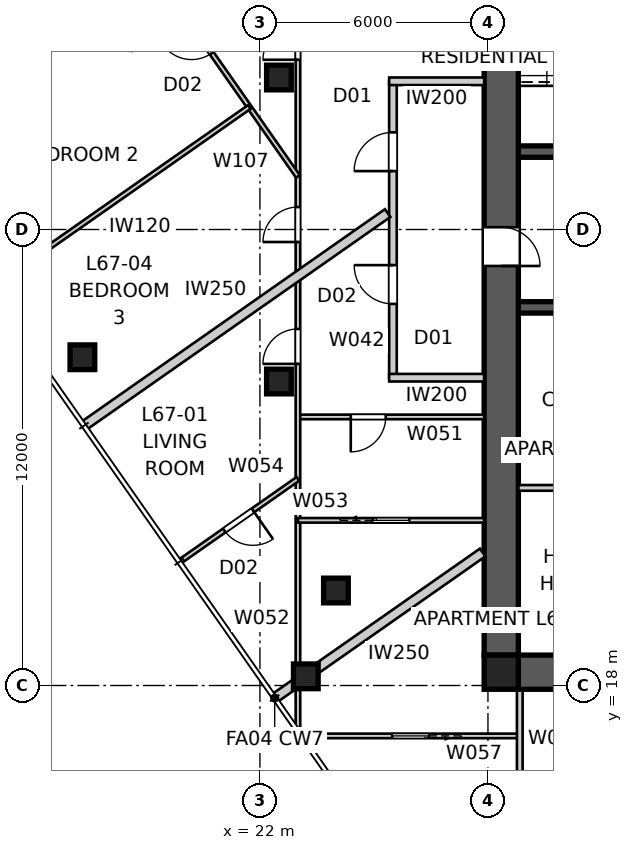
"""IFC4 building model, lengths in metres.
Left out: names, types, materials, properties, quantities, classifications, styles, units other than length and angle.
Written with IfcOpenShell. Run it as: python <this file> out.ifc"""

import sys

from ifc_helpers import new_model, si_unit, direction, frame, frame_2d, origin, origin_2d, place, context, subcontext, project, spatial, polyline, rectangle, outline, extrude, element, fill, save


model = new_model("IFC4")
c1 = context("Model", 3, precision=1e-05, world=origin(), true_north=direction((0.0, 1.0)))
c2 = subcontext(c1, "Body", "Model", "MODEL_VIEW")
j1 = project(units=[si_unit("LENGTHUNIT", "METRE"), si_unit("PLANEANGLEUNIT", "RADIAN")], contexts=[c1])
p1 = place(None, origin())
s1 = spatial("IfcSite", under=j1, at=p1, CompositionType="ELEMENT")
p2 = place(p1, origin())
s2 = spatial("IfcBuilding", under=s1, at=p2, CompositionType="ELEMENT")
p3 = place(p2, frame((0.0, 0.0, 243.8)))
s3 = spatial("IfcBuildingStorey", under=s2, at=p3, CompositionType="ELEMENT", Elevation=243.8)
p4 = place(p3, frame((51.2, 18.35, 0.0), z_axis=(0.0, 0.0, 1.0), x_axis=(-1.0, 0.0, 0.0)))
e1 = element("IfcWall", 1, at=p4, inside=s3, PredefinedType="SHEAR", context=c2, shape_type="SweptSolid", body=[
    extrude(outline(polyline([(0.0, -0.45), (22.4, -0.45), (22.4, -0.025), (22.85, -0.025), (22.85, 0.025), (22.4, 0.025), (22.4, 0.45), (0.0, 0.45), (0.0, 0.025), (-0.45, 0.025), (-0.45, -0.025), (0.0, -0.025), (0.0, -0.45)])), origin(), (0.0, 0.0, 1.0), 3.4),
])
p5 = place(p3, frame((28.35, 41.2, 0.0), z_axis=(0.0, 0.0, 1.0), x_axis=(0.0, -1.0, 0.0)))
e2 = element("IfcWall", 2, at=p5, inside=s3, PredefinedType="SHEAR", context=c2, shape_type="SweptSolid", body=[
    extrude(outline(polyline([(0.0, -0.45), (22.4, -0.45), (22.4, -0.025), (22.85, -0.025), (22.85, 0.025), (22.4, 0.025), (22.4, 0.45), (0.0, 0.45), (0.0, 0.025), (-0.45, 0.025), (-0.45, -0.025), (0.0, -0.025), (0.0, -0.45)])), origin(), (0.0, 0.0, 1.0), 3.4),
])
p6 = place(p5, frame((11.14, 0.0, 0.0)))
e3 = element("IfcOpeningElement", 3, at=p6, cuts=e2, PredefinedType="OPENING", context=c2, shape_type="SweptSolid", body=[
    extrude(rectangle(XDim=1.02, YDim=2.4, at=frame_2d((0.51, 1.2))), frame((0.0, 0.46, 0.0), z_axis=(0.0, -1.0, 0.0), x_axis=(1.0, 0.0, 0.0)), (0.0, 0.0, 1.0), 0.92),
])
p7 = place(p3, frame((28.8, 32.05, 0.0), z_axis=(0.0, 0.0, 1.0), x_axis=(1.0, 0.0, 0.0)))
e4 = element("IfcWall", 4, at=p7, inside=s3, PredefinedType="SHEAR", context=c2, shape_type="SweptSolid", body=[
    extrude(rectangle(XDim=22.4, YDim=0.3, at=frame_2d((11.2, 0.0))), origin(), (0.0, 0.0, 1.0), 3.4),
])
p8 = place(p7, frame((19.04, 0.0, 0.0)))
e5 = element("IfcOpeningElement", 5, at=p8, cuts=e4, PredefinedType="OPENING", context=c2, shape_type="SweptSolid", body=[
    extrude(rectangle(XDim=0.92, YDim=2.1, at=frame_2d((0.46, 1.05))), frame((0.0, 0.16, 0.0), z_axis=(0.0, -1.0, 0.0), x_axis=(1.0, 0.0, 0.0)), (0.0, 0.0, 1.0), 0.32),
])
p9 = place(p7, frame((1.265, 0.0, 0.0)))
e6 = element("IfcOpeningElement", 6, at=p9, cuts=e4, PredefinedType="OPENING", context=c2, shape_type="SweptSolid", body=[
    extrude(rectangle(XDim=1.02, YDim=2.1, at=frame_2d((0.51, 1.05))), frame((0.0, 0.16, 0.0), z_axis=(0.0, -1.0, 0.0), x_axis=(1.0, 0.0, 0.0)), (0.0, 0.0, 1.0), 0.32),
])
p10 = place(p7, frame((4.015, 0.0, 0.0)))
e7 = element("IfcOpeningElement", 7, at=p10, cuts=e4, PredefinedType="OPENING", context=c2, shape_type="SweptSolid", body=[
    extrude(rectangle(XDim=0.92, YDim=2.1, at=frame_2d((0.46, 1.05))), frame((0.0, 0.16, 0.0), z_axis=(0.0, -1.0, 0.0), x_axis=(1.0, 0.0, 0.0)), (0.0, 0.0, 1.0), 0.32),
])
p11 = place(p7, frame((6.115, 0.0, 0.0)))
e8 = element("IfcOpeningElement", 8, at=p11, cuts=e4, PredefinedType="OPENING", context=c2, shape_type="SweptSolid", body=[
    extrude(rectangle(XDim=0.92, YDim=2.1, at=frame_2d((0.46, 1.05))), frame((0.0, 0.16, 0.0), z_axis=(0.0, -1.0, 0.0), x_axis=(1.0, 0.0, 0.0)), (0.0, 0.0, 1.0), 0.32),
])
p12 = place(p7, frame((9.79, 0.0, 0.0)))
e9 = element("IfcOpeningElement", 9, at=p12, cuts=e4, PredefinedType="OPENING", context=c2, shape_type="SweptSolid", body=[
    extrude(rectangle(XDim=0.92, YDim=2.1, at=frame_2d((0.46, 1.05))), frame((0.0, 0.16, 0.0), z_axis=(0.0, -1.0, 0.0), x_axis=(1.0, 0.0, 0.0)), (0.0, 0.0, 1.0), 0.32),
])
p13 = place(p7, frame((12.05, 0.0, 0.0)))
e10 = element("IfcOpeningElement", 10, at=p13, cuts=e4, PredefinedType="OPENING", context=c2, shape_type="SweptSolid", body=[
    extrude(rectangle(XDim=1.1, YDim=2.1, at=frame_2d((0.55, 1.05))), frame((0.0, 0.16, 0.0), z_axis=(0.0, -1.0, 0.0), x_axis=(1.0, 0.0, 0.0)), (0.0, 0.0, 1.0), 0.32),
])
p14 = place(p7, frame((14.85, 0.0, 0.0)))
e11 = element("IfcOpeningElement", 11, at=p14, cuts=e4, PredefinedType="OPENING", context=c2, shape_type="SweptSolid", body=[
    extrude(rectangle(XDim=1.1, YDim=2.1, at=frame_2d((0.55, 1.05))), frame((0.0, 0.16, 0.0), z_axis=(0.0, -1.0, 0.0), x_axis=(1.0, 0.0, 0.0)), (0.0, 0.0, 1.0), 0.32),
])
p15 = place(p3, frame((51.2, 27.95, 0.0), z_axis=(0.0, 0.0, 1.0), x_axis=(-1.0, 0.0, 0.0)))
e12 = element("IfcWall", 12, at=p15, inside=s3, PredefinedType="SHEAR", context=c2, shape_type="SweptSolid", body=[
    extrude(rectangle(XDim=22.4, YDim=0.3, at=frame_2d((11.2, 0.0))), origin(), (0.0, 0.0, 1.0), 3.4),
])
p16 = place(p15, frame((19.04, 0.0, 0.0)))
e13 = element("IfcOpeningElement", 13, at=p16, cuts=e12, PredefinedType="OPENING", context=c2, shape_type="SweptSolid", body=[
    extrude(rectangle(XDim=0.92, YDim=2.1, at=frame_2d((0.46, 1.05))), frame((0.0, 0.16, 0.0), z_axis=(0.0, -1.0, 0.0), x_axis=(1.0, 0.0, 0.0)), (0.0, 0.0, 1.0), 0.32),
])
p17 = place(p15, frame((1.265, 0.0, 0.0)))
e14 = element("IfcOpeningElement", 14, at=p17, cuts=e12, PredefinedType="OPENING", context=c2, shape_type="SweptSolid", body=[
    extrude(rectangle(XDim=1.02, YDim=2.1, at=frame_2d((0.51, 1.05))), frame((0.0, 0.16, 0.0), z_axis=(0.0, -1.0, 0.0), x_axis=(1.0, 0.0, 0.0)), (0.0, 0.0, 1.0), 0.32),
])
p18 = place(p15, frame((4.015, 0.0, 0.0)))
e15 = element("IfcOpeningElement", 15, at=p18, cuts=e12, PredefinedType="OPENING", context=c2, shape_type="SweptSolid", body=[
    extrude(rectangle(XDim=0.92, YDim=2.1, at=frame_2d((0.46, 1.05))), frame((0.0, 0.16, 0.0), z_axis=(0.0, -1.0, 0.0), x_axis=(1.0, 0.0, 0.0)), (0.0, 0.0, 1.0), 0.32),
])
p19 = place(p15, frame((9.34, 0.0, 0.0)))
e16 = element("IfcOpeningElement", 16, at=p19, cuts=e12, PredefinedType="OPENING", context=c2, shape_type="SweptSolid", body=[
    extrude(rectangle(XDim=0.92, YDim=2.1, at=frame_2d((0.46, 1.05))), frame((0.0, 0.16, 0.0), z_axis=(0.0, -1.0, 0.0), x_axis=(1.0, 0.0, 0.0)), (0.0, 0.0, 1.0), 0.32),
])
p20 = place(p15, frame((7.015, 0.0, 0.0)))
e17 = element("IfcOpeningElement", 17, at=p20, cuts=e12, PredefinedType="OPENING", context=c2, shape_type="SweptSolid", body=[
    extrude(rectangle(XDim=0.92, YDim=2.1, at=frame_2d((0.46, 1.05))), frame((0.0, 0.16, 0.0), z_axis=(0.0, -1.0, 0.0), x_axis=(1.0, 0.0, 0.0)), (0.0, 0.0, 1.0), 0.32),
])
p21 = place(p15, frame((12.05, 0.0, 0.0)))
e18 = element("IfcOpeningElement", 18, at=p21, cuts=e12, PredefinedType="OPENING", context=c2, shape_type="SweptSolid", body=[
    extrude(rectangle(XDim=1.1, YDim=2.1, at=frame_2d((0.55, 1.05))), frame((0.0, 0.16, 0.0), z_axis=(0.0, -1.0, 0.0), x_axis=(1.0, 0.0, 0.0)), (0.0, 0.0, 1.0), 0.32),
])
p22 = place(p15, frame((14.85, 0.0, 0.0)))
e19 = element("IfcOpeningElement", 19, at=p22, cuts=e12, PredefinedType="OPENING", context=c2, shape_type="SweptSolid", body=[
    extrude(rectangle(XDim=1.1, YDim=2.1, at=frame_2d((0.55, 1.05))), frame((0.0, 0.16, 0.0), z_axis=(0.0, -1.0, 0.0), x_axis=(1.0, 0.0, 0.0)), (0.0, 0.0, 1.0), 0.32),
])
p23 = place(p3, frame((28.35, 18.35, 0.0), z_axis=(0.0, 0.0, 1.0), x_axis=(1.0, 0.0, 0.0)))
e20 = element("IfcColumn", 20, at=p23, inside=s3, PredefinedType="COLUMN", context=c2, shape_type="SweptSolid", body=[
    extrude(rectangle(XDim=0.9, YDim=0.9, at=origin_2d()), origin(), (0.0, 0.0, 1.0), 3.4),
])
for number, where, z_axis, x_axis in (
    (21, (17.328, 26.638, 0.0), (0.0, 0.0, 1.0), (1.0, 0.0, 0.0)),
    (22, (23.207, 18.242, 0.0), (0.0, 0.0, 1.0), (1.0, 0.0, 0.0)),
    (23, (22.5, 34.0, 0.0), (0.0, 0.0, 1.0), (1.0, 0.0, 0.0)),
    (24, (22.5, 26.0, 0.0), (0.0, 0.0, 1.0), (1.0, 0.0, 0.0)),
    (25, (24.0, 20.5, 0.0), (0.0, 0.0, 1.0), (1.0, 0.0, 0.0)),
):
    element("IfcColumn", number, at=place(p3, frame(where, z_axis=z_axis, x_axis=x_axis)), inside=s3, PredefinedType="COLUMN", context=c2, shape_type="SweptSolid", body=[
        extrude(rectangle(XDim=0.65, YDim=0.65, at=origin_2d()), origin(), (0.0, 0.0, 1.0), 3.4),
    ])
p24 = place(p3, frame((25.5, 26.1, 0.0), z_axis=(0.0, 0.0, 1.0), x_axis=(0.0, 1.0, 0.0)))
e26 = element("IfcWall", 26, at=p24, inside=s3, PredefinedType="PARTITIONING", context=c2, shape_type="SweptSolid", body=[
    extrude(rectangle(XDim=7.8, YDim=0.2, at=frame_2d((3.9, 0.0))), origin(), (0.0, 0.0, 1.0), 3.25),
])
p25 = place(p24, frame((1.942, 0.0, 0.0)))
e27 = element("IfcOpeningElement", 27, at=p25, cuts=e26, PredefinedType="OPENING", context=c2, shape_type="SweptSolid", body=[
    extrude(rectangle(XDim=1.02, YDim=2.34, at=frame_2d((0.51, 1.17))), frame((0.0, 0.11, 0.0), z_axis=(0.0, -1.0, 0.0), x_axis=(1.0, 0.0, 0.0)), (0.0, 0.0, 1.0), 0.22),
])
p26 = place(p24, frame((5.437, 0.0, 0.0)))
e28 = element("IfcOpeningElement", 28, at=p26, cuts=e26, PredefinedType="OPENING", context=c2, shape_type="SweptSolid", body=[
    extrude(rectangle(XDim=1.02, YDim=2.34, at=frame_2d((0.51, 1.17))), frame((0.0, 0.11, 0.0), z_axis=(0.0, -1.0, 0.0), x_axis=(1.0, 0.0, 0.0)), (0.0, 0.0, 1.0), 0.22),
])
for number, where, z_axis, x_axis in (
    (29, (27.9, 33.9, 0.0), (0.0, 0.0, 1.0), (-1.0, 0.0, 0.0)),
    (30, (27.9, 26.1, 0.0), (0.0, 0.0, 1.0), (-1.0, 0.0, 0.0)),
):
    element("IfcWall", number, at=place(p3, frame(where, z_axis=z_axis, x_axis=x_axis)), inside=s3, PredefinedType="PARTITIONING", context=c2, shape_type="SweptSolid", body=[
        extrude(rectangle(XDim=2.5, YDim=0.2, at=frame_2d((1.25, 0.0))), origin(), (0.0, 0.0, 1.0), 3.25),
    ])
p27 = place(p3, frame((22.388, 17.668, 0.0), z_axis=(0.0, 0.0, 1.0), x_axis=(0.819161528122, 0.573562891796, 0.0)))
e31 = element("IfcWall", 31, at=p27, inside=s3, PredefinedType="PARTITIONING", context=c2, shape_type="SweptSolid", body=[
    extrude(rectangle(XDim=6.681, YDim=0.25, at=frame_2d((3.341, 0.0))), origin(), (0.0, 0.0, 1.0), 3.25),
])
p28 = place(p3, frame((17.369, 24.836, 0.0), z_axis=(0.0, 0.0, 1.0), x_axis=(0.81915902312, 0.573566469418, 0.0)))
e32 = element("IfcWall", 32, at=p28, inside=s3, PredefinedType="PARTITIONING", context=c2, shape_type="SweptSolid", body=[
    extrude(rectangle(XDim=9.756, YDim=0.25, at=frame_2d((4.878, 0.0))), origin(), (0.0, 0.0, 1.0), 3.25),
])
p29 = place(p3, frame((34.25, 23.2, 0.0), z_axis=(0.0, 0.0, 1.0), x_axis=(-1.0, 0.0, 0.0)))
e33 = element("IfcWall", 33, at=p29, inside=s3, PredefinedType="SOLIDWALL", context=c2, shape_type="SweptSolid", body=[
    extrude(rectangle(XDim=5.45, YDim=0.15, at=frame_2d((2.725, 0.0))), origin(), (0.0, 0.0, 1.0), 3.25),
])
p30 = place(p29, frame((2.265, 0.0, 0.0)))
e34 = element("IfcOpeningElement", 34, at=p30, cuts=e33, PredefinedType="OPENING", context=c2, shape_type="SweptSolid", body=[
    extrude(rectangle(XDim=0.92, YDim=2.1, at=frame_2d((0.46, 1.05))), frame((0.0, 0.085, 0.0), z_axis=(0.0, -1.0, 0.0), x_axis=(1.0, 0.0, 0.0)), (0.0, 0.0, 1.0), 0.17),
])
p31 = place(p3, frame((27.9, 25.068, 0.0), z_axis=(0.0, 0.0, 1.0), x_axis=(-1.0, 0.0, 0.0)))
e35 = element("IfcWall", 35, at=p31, inside=s3, PredefinedType="PARTITIONING", context=c2, shape_type="SweptSolid", body=[
    extrude(rectangle(XDim=4.9, YDim=0.12, at=frame_2d((2.45, 0.0))), origin(), (0.0, 0.0, 1.0), 3.25),
])
p32 = place(p31, frame((2.59, 0.0, 0.0)))
e36 = element("IfcOpeningElement", 36, at=p32, cuts=e35, PredefinedType="OPENING", context=c2, shape_type="SweptSolid", body=[
    extrude(rectangle(XDim=0.92, YDim=2.34, at=frame_2d((0.46, 1.17))), frame((0.0, 0.07, 0.0), z_axis=(0.0, -1.0, 0.0), x_axis=(1.0, 0.0, 0.0)), (0.0, 0.0, 1.0), 0.14),
])
p33 = place(p3, frame((23.0, 16.864, 0.0), z_axis=(0.0, 0.0, 1.0), x_axis=(0.0, 1.0, 0.0)))
e37 = element("IfcWall", 37, at=p33, inside=s3, PredefinedType="PARTITIONING", context=c2, shape_type="SweptSolid", body=[
    extrude(rectangle(XDim=19.28, YDim=0.12, at=frame_2d((9.64, 0.0))), origin(), (0.0, 0.0, 1.0), 2.55),
])
p34 = place(p33, frame((9.599, 0.0, 0.0)))
e38 = element("IfcOpeningElement", 38, at=p34, cuts=e37, PredefinedType="OPENING", context=c2, shape_type="SweptSolid", body=[
    extrude(rectangle(XDim=0.92, YDim=2.34, at=frame_2d((0.46, 1.17))), frame((0.0, 0.07, 0.0), z_axis=(0.0, -1.0, 0.0), x_axis=(1.0, 0.0, 0.0)), (0.0, 0.0, 1.0), 0.14),
])
p35 = place(p33, frame((17.603, 0.0, 0.0)))
e39 = element("IfcOpeningElement", 39, at=p35, cuts=e37, PredefinedType="OPENING", context=c2, shape_type="SweptSolid", body=[
    extrude(rectangle(XDim=0.92, YDim=2.34, at=frame_2d((0.46, 1.17))), frame((0.0, 0.07, 0.0), z_axis=(0.0, -1.0, 0.0), x_axis=(1.0, 0.0, 0.0)), (0.0, 0.0, 1.0), 0.14),
])
p36 = place(p33, frame((12.806, 0.0, 0.0)))
e40 = element("IfcOpeningElement", 40, at=p36, cuts=e37, PredefinedType="OPENING", context=c2, shape_type="SweptSolid", body=[
    extrude(rectangle(XDim=0.92, YDim=2.34, at=frame_2d((0.46, 1.17))), frame((0.0, 0.07, 0.0), z_axis=(0.0, -1.0, 0.0), x_axis=(1.0, 0.0, 0.0)), (0.0, 0.0, 1.0), 0.14),
])
p37 = place(p3, frame((23.0, 22.347, 0.0), z_axis=(0.0, 0.0, 1.0), x_axis=(1.0, 0.0, 0.0)))
e41 = element("IfcWall", 41, at=p37, inside=s3, PredefinedType="PARTITIONING", context=c2, shape_type="SweptSolid", body=[
    extrude(rectangle(XDim=4.9, YDim=0.12, at=frame_2d((2.45, 0.0))), origin(), (0.0, 0.0, 1.0), 3.25),
])
p38 = place(p37, frame((1.97, 0.0, 0.0)))
e42 = element("IfcOpeningElement", 42, at=p38, cuts=e41, PredefinedType="OPENING", context=c2, shape_type="SweptSolid", body=[
    extrude(rectangle(XDim=0.96, YDim=2.1, at=frame_2d((0.48, 1.05))), frame((0.0, 0.07, 0.0), z_axis=(0.0, -1.0, 0.0), x_axis=(1.0, 0.0, 0.0)), (0.0, 0.0, 1.0), 0.14),
])
p39 = place(p3, frame((23.0, 23.438, 0.0), z_axis=(0.0, 0.0, 1.0), x_axis=(-0.819140645834, -0.573592714688, 0.0)))
e43 = element("IfcWall", 43, at=p39, inside=s3, PredefinedType="PARTITIONING", context=c2, shape_type="SweptSolid", body=[
    extrude(rectangle(XDim=3.77, YDim=0.12, at=frame_2d((1.885, 0.0))), origin(), (0.0, 0.0, 1.0), 3.25),
])
p40 = place(p39, frame((1.445, 0.0, 0.0)))
e44 = element("IfcOpeningElement", 44, at=p40, cuts=e43, PredefinedType="OPENING", context=c2, shape_type="SweptSolid", body=[
    extrude(rectangle(XDim=0.92, YDim=2.34, at=frame_2d((0.46, 1.17))), frame((0.0, 0.07, 0.0), z_axis=(0.0, -1.0, 0.0), x_axis=(1.0, 0.0, 0.0)), (0.0, 0.0, 1.0), 0.14),
])
p41 = place(p3, frame((28.837, 16.673, 0.0), z_axis=(0.0, 0.0, 1.0), x_axis=(-1.0, 0.0, 0.0)))
e45 = element("IfcWall", 45, at=p41, inside=s3, PredefinedType="PARTITIONING", context=c2, shape_type="SweptSolid", body=[
    extrude(rectangle(XDim=5.704, YDim=0.12, at=frame_2d((2.852, 0.0))), origin(), (0.0, 0.0, 1.0), 3.25),
])
p42 = place(p41, frame((2.396, 0.0, 0.0)))
e46 = element("IfcOpeningElement", 46, at=p42, cuts=e45, PredefinedType="OPENING", context=c2, shape_type="SweptSolid", body=[
    extrude(rectangle(XDim=0.96, YDim=2.1, at=frame_2d((0.48, 1.05))), frame((0.0, 0.07, 0.0), z_axis=(0.0, -1.0, 0.0), x_axis=(1.0, 0.0, 0.0)), (0.0, 0.0, 1.0), 0.14),
])
p43 = place(p3, frame((28.837, 17.9, 0.0), z_axis=(0.0, 0.0, 1.0), x_axis=(0.0, -1.0, 0.0)))
e47 = element("IfcWall", 47, at=p43, inside=s3, PredefinedType="SOLIDWALL", context=c2, shape_type="SweptSolid", body=[
    extrude(rectangle(XDim=4.9, YDim=0.15, at=frame_2d((2.45, 0.0))), origin(), (0.0, 0.0, 1.0), 3.25),
])
p44 = place(p43, frame((2.603, 0.0, 0.0)))
e48 = element("IfcOpeningElement", 48, at=p44, cuts=e47, PredefinedType="OPENING", context=c2, shape_type="SweptSolid", body=[
    extrude(rectangle(XDim=0.92, YDim=2.34, at=frame_2d((0.46, 1.17))), frame((0.0, 0.085, 0.0), z_axis=(0.0, -1.0, 0.0), x_axis=(1.0, 0.0, 0.0)), (0.0, 0.0, 1.0), 0.17),
])
p45 = place(p3, frame((23.0, 31.396, 0.0), z_axis=(0.0, 0.0, 1.0), x_axis=(-0.573575545802, 0.819152667857, 0.0)))
e49 = element("IfcWall", 49, at=p45, inside=s3, PredefinedType="PARTITIONING", context=c2, shape_type="SweptSolid", body=[
    extrude(rectangle(XDim=10.566, YDim=0.12, at=frame_2d((5.283, 0.0))), origin(), (0.0, 0.0, 1.0), 3.25),
])
p46 = place(p45, frame((3.958, 0.0, 0.0)))
e50 = element("IfcOpeningElement", 50, at=p46, cuts=e49, PredefinedType="OPENING", context=c2, shape_type="SweptSolid", body=[
    extrude(rectangle(XDim=0.92, YDim=2.34, at=frame_2d((0.46, 1.17))), frame((0.0, 0.07, 0.0), z_axis=(0.0, -1.0, 0.0), x_axis=(1.0, 0.0, 0.0)), (0.0, 0.0, 1.0), 0.14),
])
p47 = place(p45, frame((8.121, 0.0, 0.0)))
e51 = element("IfcOpeningElement", 51, at=p47, cuts=e49, PredefinedType="OPENING", context=c2, shape_type="SweptSolid", body=[
    extrude(rectangle(XDim=0.92, YDim=2.34, at=frame_2d((0.46, 1.17))), frame((0.0, 0.07, 0.0), z_axis=(0.0, -1.0, 0.0), x_axis=(1.0, 0.0, 0.0)), (0.0, 0.0, 1.0), 0.14),
])
p48 = place(p3, frame((21.72, 33.223, 0.0), z_axis=(0.0, 0.0, 1.0), x_axis=(-0.819152099525, -0.573576357466, 0.0)))
e52 = element("IfcWall", 52, at=p48, inside=s3, PredefinedType="PARTITIONING", context=c2, shape_type="SweptSolid", body=[
    extrude(rectangle(XDim=8.335, YDim=0.12, at=frame_2d((4.167, 0.0))), origin(), (0.0, 0.0, 1.0), 3.25),
])
p49 = place(p3, frame((15.66, 34.321, 0.0), z_axis=(0.0, 0.0, 1.0), x_axis=(0.819165768115, 0.573556836197, 0.0)))
e53 = element("IfcWall", 53, at=p49, inside=s3, PredefinedType="PARTITIONING", context=c2, shape_type="SweptSolid", body=[
    extrude(rectangle(XDim=4.335, YDim=0.12, at=frame_2d((2.167, 0.0))), origin(), (0.0, 0.0, 1.0), 3.25),
])
p50 = place(p25, origin())
e54 = element("IfcDoor", 54, at=p50, inside=s3, OperationType="SINGLE_SWING_RIGHT", PredefinedType="DOOR", context=c2, shape_type="SweptSolid", body=[
    extrude(rectangle(XDim=1.02, YDim=2.34, at=frame_2d((0.51, 1.17))), frame((0.0, 0.025, 0.0), z_axis=(0.0, -1.0, 0.0), x_axis=(1.0, 0.0, 0.0)), (0.0, 0.0, 1.0), 0.05),
])
fill(e27, e54)
p51 = place(p26, origin())
e55 = element("IfcDoor", 55, at=p51, inside=s3, OperationType="SINGLE_SWING_LEFT", PredefinedType="DOOR", context=c2, shape_type="SweptSolid", body=[
    extrude(rectangle(XDim=1.02, YDim=2.34, at=frame_2d((0.51, 1.17))), frame((0.0, 0.025, 0.0), z_axis=(0.0, -1.0, 0.0), x_axis=(1.0, 0.0, 0.0)), (0.0, 0.0, 1.0), 0.05),
])
fill(e28, e55)
p52 = place(p32, origin())
e56 = element("IfcDoor", 56, at=p52, inside=s3, OperationType="SINGLE_SWING_RIGHT", PredefinedType="DOOR", context=c2, shape_type="SweptSolid", body=[
    extrude(rectangle(XDim=0.92, YDim=2.34, at=frame_2d((0.46, 1.17))), frame((0.0, 0.025, 0.0), z_axis=(0.0, -1.0, 0.0), x_axis=(1.0, 0.0, 0.0)), (0.0, 0.0, 1.0), 0.05),
])
fill(e36, e56)
p53 = place(p34, origin())
e57 = element("IfcDoor", 57, at=p53, inside=s3, OperationType="SINGLE_SWING_LEFT", PredefinedType="DOOR", context=c2, shape_type="SweptSolid", body=[
    extrude(rectangle(XDim=0.92, YDim=2.34, at=frame_2d((0.46, 1.17))), frame((0.0, 0.025, 0.0), z_axis=(0.0, -1.0, 0.0), x_axis=(1.0, 0.0, 0.0)), (0.0, 0.0, 1.0), 0.05),
])
fill(e38, e57)
p54 = place(p35, origin())
e58 = element("IfcDoor", 58, at=p54, inside=s3, OperationType="SINGLE_SWING_LEFT", PredefinedType="DOOR", context=c2, shape_type="SweptSolid", body=[
    extrude(rectangle(XDim=0.92, YDim=2.34, at=frame_2d((0.46, 1.17))), frame((0.0, 0.025, 0.0), z_axis=(0.0, -1.0, 0.0), x_axis=(1.0, 0.0, 0.0)), (0.0, 0.0, 1.0), 0.05),
])
fill(e39, e58)
p55 = place(p36, origin())
e59 = element("IfcDoor", 59, at=p55, inside=s3, OperationType="SINGLE_SWING_LEFT", PredefinedType="DOOR", context=c2, shape_type="SweptSolid", body=[
    extrude(rectangle(XDim=0.92, YDim=2.34, at=frame_2d((0.46, 1.17))), frame((0.0, 0.025, 0.0), z_axis=(0.0, -1.0, 0.0), x_axis=(1.0, 0.0, 0.0)), (0.0, 0.0, 1.0), 0.05),
])
fill(e40, e59)
p56 = place(p38, origin())
e60 = element("IfcDoor", 60, at=p56, inside=s3, OperationType="SLIDING_TO_LEFT", PredefinedType="DOOR", context=c2, shape_type="SweptSolid", body=[
    extrude(rectangle(XDim=0.96, YDim=2.1, at=frame_2d((0.48, 1.05))), frame((0.0, 0.025, 0.0), z_axis=(0.0, -1.0, 0.0), x_axis=(1.0, 0.0, 0.0)), (0.0, 0.0, 1.0), 0.05),
])
fill(e42, e60)
p57 = place(p40, origin())
e61 = element("IfcDoor", 61, at=p57, inside=s3, OperationType="SINGLE_SWING_LEFT", PredefinedType="DOOR", context=c2, shape_type="SweptSolid", body=[
    extrude(rectangle(XDim=0.92, YDim=2.34, at=frame_2d((0.46, 1.17))), frame((0.0, 0.025, 0.0), z_axis=(0.0, -1.0, 0.0), x_axis=(1.0, 0.0, 0.0)), (0.0, 0.0, 1.0), 0.05),
])
fill(e44, e61)
p58 = place(p42, origin())
e62 = element("IfcDoor", 62, at=p58, inside=s3, OperationType="SLIDING_TO_LEFT", PredefinedType="DOOR", context=c2, shape_type="SweptSolid", body=[
    extrude(rectangle(XDim=0.96, YDim=2.1, at=frame_2d((0.48, 1.05))), frame((0.0, 0.025, 0.0), z_axis=(0.0, -1.0, 0.0), x_axis=(1.0, 0.0, 0.0)), (0.0, 0.0, 1.0), 0.05),
])
fill(e46, e62)
p59 = place(p46, origin())
e63 = element("IfcDoor", 63, at=p59, inside=s3, OperationType="SINGLE_SWING_RIGHT", PredefinedType="DOOR", context=c2, shape_type="SweptSolid", body=[
    extrude(rectangle(XDim=0.92, YDim=2.34, at=frame_2d((0.46, 1.17))), frame((0.0, 0.025, 0.0), z_axis=(0.0, -1.0, 0.0), x_axis=(1.0, 0.0, 0.0)), (0.0, 0.0, 1.0), 0.05),
])
fill(e50, e63)
p60 = place(p6, origin())
e64 = element("IfcDoor", 64, at=p60, inside=s3, OperationType="SINGLE_SWING_RIGHT", PredefinedType="DOOR", context=c2, shape_type="SweptSolid", body=[
    extrude(rectangle(XDim=1.02, YDim=2.4, at=frame_2d((0.51, 1.2))), frame((0.0, 0.025, 0.0), z_axis=(0.0, -1.0, 0.0), x_axis=(1.0, 0.0, 0.0)), (0.0, 0.0, 1.0), 0.05),
])
fill(e3, e64)
save(model, sys.argv[1])
